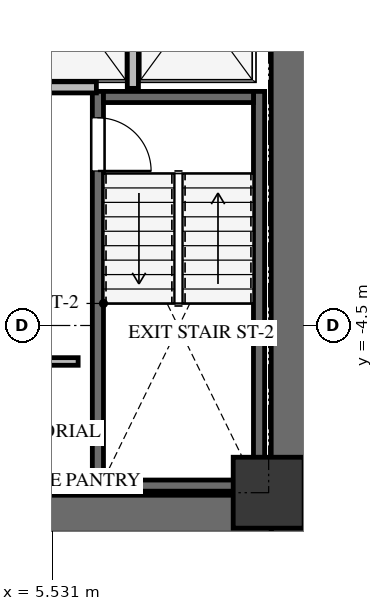
"""IFC4 building model, lengths in metres.
Left out: names, types, materials, properties, quantities, classifications, styles, units other than length and angle.
Written with IfcOpenShell. Run it as: python <this file> out.ifc"""

import sys

from ifc_helpers import new_model, si_unit, direction, frame, frame_2d, origin, origin_2d, place, context, subcontext, project, spatial, rectangle, extrude, source, transform, mapped, element, fill, save


model = new_model("IFC4")
c1 = context("Model", 3, precision=1e-05, world=origin(), true_north=direction((0.0, 1.0)))
c2 = subcontext(c1, "Body", "Model", "MODEL_VIEW")
j1 = project(units=[si_unit("LENGTHUNIT", "METRE"), si_unit("PLANEANGLEUNIT", "RADIAN")], contexts=[c1])
p1 = place(None, origin())
s1 = spatial("IfcSite", under=j1, at=p1, CompositionType="ELEMENT")
p2 = place(p1, origin())
s2 = spatial("IfcBuilding", under=s1, at=p2, CompositionType="ELEMENT")
p3 = place(p2, frame((0.0, 0.0, 130.5)))
s3 = spatial("IfcBuildingStorey", under=s2, at=p3, CompositionType="ELEMENT", Elevation=130.5)
p4 = place(p3, frame((10.225, -8.6, 0.0), z_axis=(0.0, 0.0, 1.0), x_axis=(0.0, 1.0, 0.0)))
e1 = element("IfcWall", 1, at=p4, inside=s3, PredefinedType="SHEAR", context=c2, shape_type="SweptSolid", body=[
    extrude(rectangle(XDim=17.2, YDim=0.75, at=frame_2d((8.6, 0.0))), origin(), (0.0, 0.0, 1.0), 3.3),
])
p5 = place(p3, frame((2.1, -8.225, 0.0), z_axis=(0.0, 0.0, 1.0), x_axis=(1.0, 0.0, 0.0)))
e2 = element("IfcWall", 2, at=p5, inside=s3, PredefinedType="SHEAR", context=c2, shape_type="SweptSolid", body=[
    extrude(rectangle(XDim=7.75, YDim=0.75, at=frame_2d((3.875, 0.0))), origin(), (0.0, 0.0, 1.0), 3.3),
])
p6 = place(p3, frame((9.61, -7.77, -0.24), z_axis=(0.0, 0.0, 1.0), x_axis=(0.0, 1.0, 0.0)))
e3 = element("IfcWall", 3, at=p6, inside=s3, PredefinedType="SHEAR", context=c2, shape_type="SweptSolid", body=[
    extrude(rectangle(XDim=7.89, YDim=0.22, at=frame_2d((3.945, 0.0))), origin(), (0.0, 0.0, 1.0), 3.3),
])
p7 = place(p3, frame((6.43, 0.12, -0.24), z_axis=(0.0, 0.0, 1.0), x_axis=(0.0, -1.0, 0.0)))
e4 = element("IfcWall", 4, at=p7, inside=s3, PredefinedType="SHEAR", context=c2, shape_type="SweptSolid", body=[
    extrude(rectangle(XDim=7.89, YDim=0.22, at=frame_2d((3.945, 0.0))), origin(), (0.0, 0.0, 1.0), 3.3),
])
p8 = place(p7, frame((0.52, 0.0, 0.0)))
e5 = element("IfcOpeningElement", 5, at=p8, cuts=e4, PredefinedType="OPENING", context=c2, shape_type="SweptSolid", body=[
    extrude(rectangle(XDim=1.05, YDim=2.15, at=frame_2d((0.525, 1.075))), frame((0.0, 0.12, 0.0), z_axis=(0.0, -1.0, 0.0), x_axis=(1.0, 0.0, 0.0)), (0.0, 0.0, 1.0), 0.24),
])
for number, where, z_axis, x_axis in (
    (6, (6.54, -7.66, -0.24), (0.0, 0.0, 1.0), (1.0, 0.0, 0.0)),
    (7, (9.5, 0.01, -0.24), (0.0, 0.0, 1.0), (-1.0, 0.0, 0.0)),
):
    element("IfcWall", number, at=place(p3, frame(where, z_axis=z_axis, x_axis=x_axis)), inside=s3, PredefinedType="SHEAR", context=c2, shape_type="SweptSolid", body=[
        extrude(rectangle(XDim=2.96, YDim=0.22, at=frame_2d((1.48, 0.0))), origin(), (0.0, 0.0, 1.0), 3.3),
    ])
m1 = source(origin(), c2, "Body", "SweptSolid", [
    extrude(rectangle(XDim=1.4, YDim=1.4, at=origin_2d()), origin(), (0.0, 0.0, 1.0), 3.3),
])
p9 = place(p3, frame((9.8, -7.8, -0.24), z_axis=(0.0, 0.0, 1.0), x_axis=(1.0, 0.0, 0.0)))
e8 = element("IfcColumn", 8, at=p9, inside=s3, PredefinedType="COLUMN", context=c2, shape_type="MappedRepresentation", body=[
    mapped(m1, transform((0.0, 0.0, 0.0), x_axis=(1.0, 0.0, 0.0), y_axis=(0.0, 1.0, 0.0), z_axis=(0.0, 0.0, 1.0), scale=1.0)),
])
p10 = place(p3, frame((7.12, 0.18, 0.0), z_axis=(0.0, 0.0, 1.0), x_axis=(0.0, 1.0, 0.0)))
e9 = element("IfcWall", 9, at=p10, inside=s3, PredefinedType="SOLIDWALL", context=c2, shape_type="SweptSolid", body=[
    extrude(rectangle(XDim=3.186, YDim=0.22, at=frame_2d((1.593, 0.0))), origin(), (0.0, 0.0, 1.0), 3.045),
])
p11 = place(p3, frame((4.734, 0.2, 0.0), z_axis=(0.0, 0.0, 1.0), x_axis=(1.0, 0.0, 0.0)))
e10 = element("IfcWall", 10, at=p11, inside=s3, PredefinedType="SOLIDWALL", context=c2, shape_type="SweptSolid", body=[
    extrude(rectangle(XDim=1.666, YDim=0.22, at=frame_2d((0.833, 0.0))), origin(), (0.0, 0.0, 1.0), 3.045),
])
p12 = place(p3, frame((2.51, -5.21, 0.0), z_axis=(0.0, 0.0, 1.0), x_axis=(1.0, 0.0, 0.0)))
e11 = element("IfcWall", 11, at=p12, inside=s3, PredefinedType="PARTITIONING", context=c2, shape_type="SweptSolid", body=[
    extrude(rectangle(XDim=3.53, YDim=0.15, at=frame_2d((1.765, 0.0))), origin(), (0.0, 0.0, 1.0), 3.045),
])
p13 = place(p12, frame((1.315, 0.0, 0.0)))
e12 = element("IfcOpeningElement", 12, at=p13, cuts=e11, PredefinedType="OPENING", context=c2, shape_type="SweptSolid", body=[
    extrude(rectangle(XDim=0.9, YDim=2.05, at=frame_2d((0.45, 1.025))), frame((0.0, 0.085, 0.0), z_axis=(0.0, -1.0, 0.0), x_axis=(1.0, 0.0, 0.0)), (0.0, 0.0, 1.0), 0.17),
])
m2 = source(origin(), c2, "Body", "SweptSolid", [
    extrude(rectangle(XDim=1.05, YDim=2.15, at=frame_2d((0.525, 1.075))), frame((0.0, 0.025, 0.0), z_axis=(0.0, -1.0, 0.0), x_axis=(1.0, 0.0, 0.0)), (0.0, 0.0, 1.0), 0.05),
])
p14 = place(p8, origin())
e13 = element("IfcDoor", 13, at=p14, inside=s3, OperationType="SINGLE_SWING_RIGHT", PredefinedType="DOOR", context=c2, shape_type="MappedRepresentation", body=[
    mapped(m2, transform((0.0, 0.0, 0.0), x_axis=(1.0, 0.0, 0.0), y_axis=(0.0, 1.0, 0.0), z_axis=(0.0, 0.0, 1.0), scale=1.0)),
])
fill(e5, e13)
save(model, sys.argv[1])
